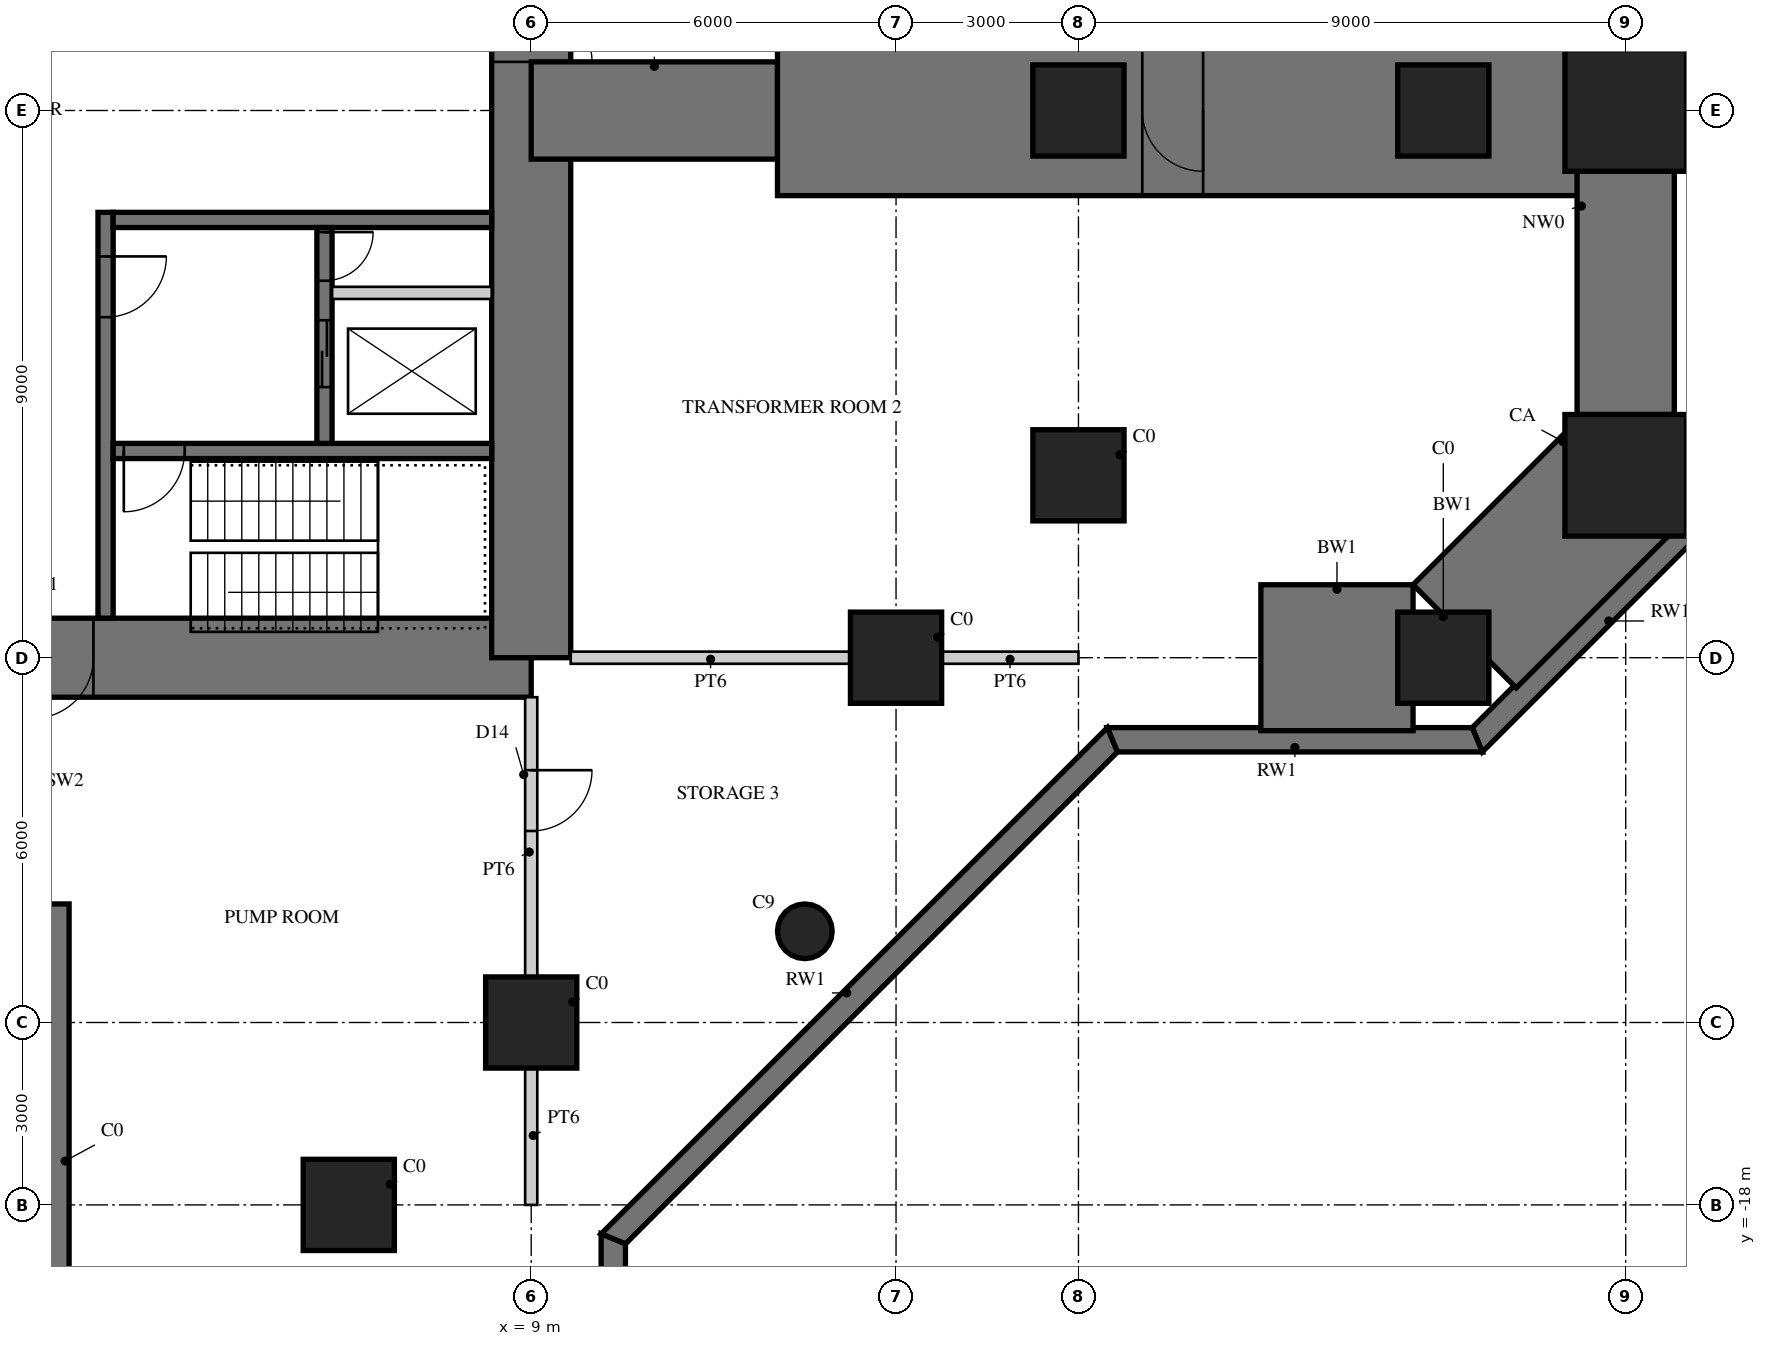
"""IFC4 building model, lengths in metres.
Left out: names, types, materials, properties, quantities, classifications, styles, units other than length and angle.
Written with IfcOpenShell. Run it as: python <this file> out.ifc"""

import sys

from ifc_helpers import new_model, si_unit, direction, frame, frame_2d, origin, origin_2d, place, context, subcontext, project, spatial, polyline, rectangle, circle, outline, extrude, element, fill, save


model = new_model("IFC4")
c1 = context("Model", 3, precision=1e-05, world=origin(), true_north=direction((0.0, 1.0)))
c2 = subcontext(c1, "Body", "Model", "MODEL_VIEW")
j1 = project(units=[si_unit("LENGTHUNIT", "METRE"), si_unit("PLANEANGLEUNIT", "RADIAN")], contexts=[c1])
p1 = place(None, origin())
s1 = spatial("IfcSite", under=j1, at=p1, CompositionType="ELEMENT")
p2 = place(p1, origin())
s2 = spatial("IfcBuilding", under=s1, at=p2, CompositionType="ELEMENT")
p3 = place(p2, frame((0.0, 0.0, -8.0)))
s3 = spatial("IfcBuildingStorey", under=s2, at=p3, CompositionType="ELEMENT", Elevation=-8.0)
p4 = place(p3, origin())
e1 = element("IfcWall", 1, at=p4, inside=s3, PredefinedType="SOLIDWALL", context=c2, shape_type="SweptSolid", body=[
    extrude(outline(polyline([(18.476, -10.15), (18.642, -10.55), (10.55, -18.642), (10.15, -18.476), (18.476, -10.15)])), origin(), (0.0, 0.0, 1.0), 4.0),
])
p5 = place(p3, origin())
e2 = element("IfcWall", 2, at=p5, inside=s3, PredefinedType="SOLIDWALL", context=c2, shape_type="SweptSolid", body=[
    extrude(outline(polyline([(10.15, -18.476), (10.55, -18.642), (10.55, -24.642), (10.15, -24.476), (10.15, -18.476)])), origin(), (0.0, 0.0, 1.0), 4.0),
])
p6 = place(p3, origin())
e3 = element("IfcWall", 3, at=p6, inside=s3, PredefinedType="SOLIDWALL", context=c2, shape_type="SweptSolid", body=[
    extrude(outline(polyline([(28.15, -6.476), (28.55, -6.642), (24.642, -10.55), (24.476, -10.15), (28.15, -6.476)])), origin(), (0.0, 0.0, 1.0), 4.0),
])
p7 = place(p3, origin())
e4 = element("IfcWall", 4, at=p7, inside=s3, PredefinedType="SOLIDWALL", context=c2, shape_type="SweptSolid", body=[
    extrude(outline(polyline([(24.476, -10.15), (24.642, -10.55), (18.642, -10.55), (18.476, -10.15), (24.476, -10.15)])), origin(), (0.0, 0.0, 1.0), 4.0),
])
p8 = place(p3, frame((-9.0, -9.0, 0.0), z_axis=(0.0, 0.0, 1.0), x_axis=(1.0, 0.0, 0.0)))
e5 = element("IfcWall", 5, at=p8, inside=s3, PredefinedType="SHEAR", context=c2, shape_type="SweptSolid", body=[
    extrude(rectangle(XDim=18.0, YDim=1.3, at=frame_2d((9.0, 0.0))), origin(), (0.0, 0.0, 1.0), 4.0),
])
p9 = place(p8, frame((9.8, 0.0, 0.0)))
e6 = element("IfcOpeningElement", 6, at=p9, cuts=e5, PredefinedType="OPENING", context=c2, shape_type="SweptSolid", body=[
    extrude(rectangle(XDim=1.0, YDim=2.4, at=frame_2d((0.5, 1.2))), frame((0.0, 0.66, 0.0), z_axis=(0.0, -1.0, 0.0), x_axis=(1.0, 0.0, 0.0)), (0.0, 0.0, 1.0), 1.32),
])
p10 = place(p3, frame((9.0, -9.0, 0.0), z_axis=(0.0, 0.0, 1.0), x_axis=(0.0, 1.0, 0.0)))
e7 = element("IfcWall", 7, at=p10, inside=s3, PredefinedType="SHEAR", context=c2, shape_type="SweptSolid", body=[
    extrude(rectangle(XDim=18.0, YDim=1.3, at=frame_2d((9.0, 0.0))), origin(), (0.0, 0.0, 1.0), 4.0),
])
p11 = place(p10, frame((9.8, 0.0, 0.0)))
e8 = element("IfcOpeningElement", 8, at=p11, cuts=e7, PredefinedType="OPENING", context=c2, shape_type="SweptSolid", body=[
    extrude(rectangle(XDim=1.0, YDim=2.4, at=frame_2d((0.5, 1.2))), frame((0.0, 0.66, 0.0), z_axis=(0.0, -1.0, 0.0), x_axis=(1.0, 0.0, 0.0)), (0.0, 0.0, 1.0), 1.32),
])
p12 = place(p3, frame((2.0, -1.675, 0.0), z_axis=(0.0, 0.0, 1.0), x_axis=(0.0, -1.0, 0.0)))
e9 = element("IfcWall", 9, at=p12, inside=s3, PredefinedType="SHEAR", context=c2, shape_type="SweptSolid", body=[
    extrude(rectangle(XDim=6.675, YDim=0.25, at=frame_2d((3.337, 0.0))), origin(), (0.0, 0.0, 1.0), 4.0),
])
p13 = place(p12, frame((0.725, 0.0, 0.0)))
e10 = element("IfcOpeningElement", 10, at=p13, cuts=e9, PredefinedType="OPENING", context=c2, shape_type="SweptSolid", body=[
    extrude(rectangle(XDim=1.0, YDim=2.1, at=frame_2d((0.5, 1.05))), frame((0.0, 0.135, 0.0), z_axis=(0.0, -1.0, 0.0), x_axis=(1.0, 0.0, 0.0)), (0.0, 0.0, 1.0), 0.27),
])
p14 = place(p3, frame((2.125, -1.8, 0.0), z_axis=(0.0, 0.0, 1.0), x_axis=(1.0, 0.0, 0.0)))
e11 = element("IfcWall", 11, at=p14, inside=s3, PredefinedType="SHEAR", context=c2, shape_type="SweptSolid", body=[
    extrude(rectangle(XDim=6.225, YDim=0.25, at=frame_2d((3.113, 0.0))), origin(), (0.0, 0.0, 1.0), 4.0),
])
p15 = place(p3, frame((2.125, -5.6, 0.0), z_axis=(0.0, 0.0, 1.0), x_axis=(1.0, 0.0, 0.0)))
e12 = element("IfcWall", 12, at=p15, inside=s3, PredefinedType="SHEAR", context=c2, shape_type="SweptSolid", body=[
    extrude(rectangle(XDim=6.225, YDim=0.25, at=frame_2d((3.113, 0.0))), origin(), (0.0, 0.0, 1.0), 4.0),
])
p16 = place(p15, frame((0.175, 0.0, 0.0)))
e13 = element("IfcOpeningElement", 13, at=p16, cuts=e12, PredefinedType="OPENING", context=c2, shape_type="SweptSolid", body=[
    extrude(rectangle(XDim=1.0, YDim=2.1, at=frame_2d((0.5, 1.05))), frame((0.0, 0.135, 0.0), z_axis=(0.0, -1.0, 0.0), x_axis=(1.0, 0.0, 0.0)), (0.0, 0.0, 1.0), 0.27),
])
p17 = place(p3, frame((5.6, -1.925, 0.0), z_axis=(0.0, 0.0, 1.0), x_axis=(0.0, -1.0, 0.0)))
e14 = element("IfcWall", 14, at=p17, inside=s3, PredefinedType="SHEAR", context=c2, shape_type="SweptSolid", body=[
    extrude(rectangle(XDim=3.55, YDim=0.25, at=frame_2d((1.775, 0.0))), origin(), (0.0, 0.0, 1.0), 4.0),
])
p18 = place(p17, frame((1.525, 0.0, 0.0)))
e15 = element("IfcOpeningElement", 15, at=p18, cuts=e14, PredefinedType="OPENING", context=c2, shape_type="SweptSolid", body=[
    extrude(rectangle(XDim=1.1, YDim=2.2, at=frame_2d((0.55, 1.1))), frame((0.0, 0.135, 0.0), z_axis=(0.0, -1.0, 0.0), x_axis=(1.0, 0.0, 0.0)), (0.0, 0.0, 1.0), 0.27),
])
p19 = place(p17, frame((0.075, 0.0, 0.0)))
e16 = element("IfcOpeningElement", 16, at=p19, cuts=e14, PredefinedType="OPENING", context=c2, shape_type="SweptSolid", body=[
    extrude(rectangle(XDim=0.8, YDim=2.1, at=frame_2d((0.4, 1.05))), frame((0.0, 0.135, 0.0), z_axis=(0.0, -1.0, 0.0), x_axis=(1.0, 0.0, 0.0)), (0.0, 0.0, 1.0), 0.27),
])
p20 = place(p3, frame((5.725, -3.0, 0.0), z_axis=(0.0, 0.0, 1.0), x_axis=(1.0, 0.0, 0.0)))
e17 = element("IfcWall", 17, at=p20, inside=s3, PredefinedType="PARTITIONING", context=c2, shape_type="SweptSolid", body=[
    extrude(rectangle(XDim=2.625, YDim=0.2, at=frame_2d((1.312, 0.0))), origin(), (0.0, 0.0, 1.0), 4.0),
])
p21 = place(p3, frame((9.0, 0.0, 0.0), z_axis=(0.0, 0.0, 1.0), x_axis=(1.0, 0.0, 0.0)))
e18 = element("IfcWall", 18, at=p21, inside=s3, PredefinedType="SHEAR", context=c2, shape_type="SweptSolid", body=[
    extrude(rectangle(XDim=4.05, YDim=1.6, at=frame_2d((2.025, 0.0))), origin(), (0.0, 0.0, 1.0), 4.0),
])
p22 = place(p3, frame((13.05, 0.0, 0.0), z_axis=(0.0, 0.0, 1.0), x_axis=(1.0, 0.0, 0.0)))
e19 = element("IfcWall", 19, at=p22, inside=s3, PredefinedType="SHEAR", context=c2, shape_type="SweptSolid", body=[
    extrude(rectangle(XDim=13.95, YDim=2.8, at=frame_2d((6.975, 0.0))), origin(), (0.0, 0.0, 1.0), 4.0),
])
p23 = place(p22, frame((6.0, 0.0, 0.0)))
e20 = element("IfcOpeningElement", 20, at=p23, cuts=e19, PredefinedType="OPENING", context=c2, shape_type="SweptSolid", body=[
    extrude(rectangle(XDim=1.0, YDim=2.2, at=frame_2d((0.5, 1.1))), frame((0.0, 1.41, 0.0), z_axis=(0.0, -1.0, 0.0), x_axis=(1.0, 0.0, 0.0)), (0.0, 0.0, 1.0), 2.82),
])
p24 = place(p3, frame((21.0, -9.0, 0.0), z_axis=(0.0, 0.0, 1.0), x_axis=(1.0, 0.0, 0.0)))
e21 = element("IfcWall", 21, at=p24, inside=s3, PredefinedType="SHEAR", context=c2, shape_type="SweptSolid", body=[
    extrude(rectangle(XDim=2.503, YDim=2.4, at=frame_2d((1.251, 0.0))), origin(), (0.0, 0.0, 1.0), 4.0),
])
p25 = place(p3, frame((24.352, -8.648, 0.0), z_axis=(0.0, 0.0, 1.0), x_axis=(0.707106781187, 0.707106781187, 0.0)))
e22 = element("IfcWall", 22, at=p25, inside=s3, PredefinedType="SHEAR", context=c2, shape_type="SweptSolid", body=[
    extrude(rectangle(XDim=3.745, YDim=2.4, at=frame_2d((1.873, 0.0))), origin(), (0.0, 0.0, 1.0), 4.0),
])
p26 = place(p3, frame((27.0, -5.0, 0.0), z_axis=(0.0, 0.0, 1.0), x_axis=(0.0, 1.0, 0.0)))
e23 = element("IfcWall", 23, at=p26, inside=s3, PredefinedType="SHEAR", context=c2, shape_type="SweptSolid", body=[
    extrude(rectangle(XDim=10.0, YDim=1.6, at=frame_2d((5.0, 0.0))), origin(), (0.0, 0.0, 1.0), 4.0),
])
p27 = place(p3, frame((0.0, -13.05, 0.0), z_axis=(0.0, 0.0, 1.0), x_axis=(0.0, -1.0, 0.0)))
e24 = element("IfcWall", 24, at=p27, inside=s3, PredefinedType="SHEAR", context=c2, shape_type="SweptSolid", body=[
    extrude(rectangle(XDim=13.95, YDim=2.8, at=frame_2d((6.975, 0.0))), origin(), (0.0, 0.0, 1.0), 4.0),
])
p28 = place(p27, frame((6.0, 0.0, 0.0)))
e25 = element("IfcOpeningElement", 25, at=p28, cuts=e24, PredefinedType="OPENING", context=c2, shape_type="SweptSolid", body=[
    extrude(rectangle(XDim=1.0, YDim=2.2, at=frame_2d((0.5, 1.1))), frame((0.0, 1.41, 0.0), z_axis=(0.0, -1.0, 0.0), x_axis=(1.0, 0.0, 0.0)), (0.0, 0.0, 1.0), 2.82),
])
for number, where, z_axis, x_axis in (
    (26, (15.0, -9.0, 0.0), (0.0, 0.0, 1.0), (1.0, 0.0, 0.0)),
    (27, (24.0, -9.0, 0.0), (0.0, 0.0, 1.0), (1.0, 0.0, 0.0)),
):
    element("IfcColumn", number, at=place(p3, frame(where, z_axis=z_axis, x_axis=x_axis)), inside=s3, PredefinedType="COLUMN", context=c2, shape_type="SweptSolid", body=[
        extrude(rectangle(XDim=1.5, YDim=1.5, at=origin_2d()), origin(), (0.0, 0.0, 1.0), 4.0),
    ])
for number, where, z_axis, x_axis in (
    (28, (27.0, -6.0, 0.0), (0.0, 0.0, 1.0), (1.0, 0.0, 0.0)),
    (29, (27.0, 0.0, 0.0), (0.0, 0.0, 1.0), (1.0, 0.0, 0.0)),
):
    element("IfcColumn", number, at=place(p3, frame(where, z_axis=z_axis, x_axis=x_axis)), inside=s3, PredefinedType="COLUMN", context=c2, shape_type="SweptSolid", body=[
        extrude(rectangle(XDim=2.0, YDim=2.0, at=origin_2d()), origin(), (0.0, 0.0, 1.0), 4.0),
    ])
for number, where, z_axis, x_axis in (
    (30, (9.0, -15.0, 0.0), (0.0, 0.0, 1.0), (1.0, 0.0, 0.0)),
    (31, (18.0, -6.0, 0.0), (0.0, 0.0, 1.0), (1.0, 0.0, 0.0)),
    (32, (18.0, 0.0, 0.0), (0.0, 0.0, 1.0), (1.0, 0.0, 0.0)),
    (33, (24.0, 0.0, 0.0), (0.0, 0.0, 1.0), (1.0, 0.0, 0.0)),
    (34, (6.0, -18.0, 0.0), (0.0, 0.0, 1.0), (1.0, 0.0, 0.0)),
):
    element("IfcColumn", number, at=place(p3, frame(where, z_axis=z_axis, x_axis=x_axis)), inside=s3, PredefinedType="COLUMN", context=c2, shape_type="SweptSolid", body=[
        extrude(rectangle(XDim=1.5, YDim=1.5, at=origin_2d()), origin(), (0.0, 0.0, 1.0), 4.0),
    ])
p29 = place(p3, frame((13.5, -13.5, 0.0), z_axis=(0.0, 0.0, 1.0), x_axis=(1.0, 0.0, 0.0)))
e35 = element("IfcColumn", 35, at=p29, inside=s3, PredefinedType="COLUMN", context=c2, shape_type="SweptSolid", body=[
    extrude(circle(Radius=0.45, at=origin_2d()), origin(), (0.0, 0.0, 1.0), 4.0),
])
p30 = place(p3, frame((9.0, -9.65, 0.0), z_axis=(0.0, 0.0, 1.0), x_axis=(0.0, -1.0, 0.0)))
e36 = element("IfcWall", 36, at=p30, inside=s3, PredefinedType="SOLIDWALL", context=c2, shape_type="SweptSolid", body=[
    extrude(rectangle(XDim=4.6, YDim=0.2, at=frame_2d((2.3, 0.0))), origin(), (0.0, 0.0, 1.0), 2.75),
])
p31 = place(p30, frame((1.2, 0.0, 0.0)))
e37 = element("IfcOpeningElement", 37, at=p31, cuts=e36, PredefinedType="OPENING", context=c2, shape_type="SweptSolid", body=[
    extrude(rectangle(XDim=1.0, YDim=2.2, at=frame_2d((0.5, 1.1))), frame((0.0, 0.11, 0.0), z_axis=(0.0, -1.0, 0.0), x_axis=(1.0, 0.0, 0.0)), (0.0, 0.0, 1.0), 0.22),
])
p32 = place(p3, frame((9.0, -15.75, 0.0), z_axis=(0.0, 0.0, 1.0), x_axis=(0.0, -1.0, 0.0)))
e38 = element("IfcWall", 38, at=p32, inside=s3, PredefinedType="SOLIDWALL", context=c2, shape_type="SweptSolid", body=[
    extrude(rectangle(XDim=2.25, YDim=0.2, at=frame_2d((1.125, 0.0))), origin(), (0.0, 0.0, 1.0), 2.75),
])
p33 = place(p3, frame((14.25, -9.0, 0.0), z_axis=(0.0, 0.0, 1.0), x_axis=(-1.0, 0.0, 0.0)))
e39 = element("IfcWall", 39, at=p33, inside=s3, PredefinedType="SOLIDWALL", context=c2, shape_type="SweptSolid", body=[
    extrude(rectangle(XDim=4.6, YDim=0.2, at=frame_2d((2.3, 0.0))), origin(), (0.0, 0.0, 1.0), 2.75),
])
p34 = place(p3, frame((18.0, -9.0, 0.0), z_axis=(0.0, 0.0, 1.0), x_axis=(-1.0, 0.0, 0.0)))
e40 = element("IfcWall", 40, at=p34, inside=s3, PredefinedType="SOLIDWALL", context=c2, shape_type="SweptSolid", body=[
    extrude(rectangle(XDim=2.25, YDim=0.2, at=frame_2d((1.125, 0.0))), origin(), (0.0, 0.0, 1.0), 2.75),
])
p35 = place(p31, origin())
e41 = element("IfcDoor", 41, at=p35, inside=s3, OperationType="SINGLE_SWING_LEFT", PredefinedType="DOOR", context=c2, shape_type="SweptSolid", body=[
    extrude(rectangle(XDim=1.0, YDim=2.2, at=frame_2d((0.5, 1.1))), frame((0.0, 0.025, 0.0), z_axis=(0.0, -1.0, 0.0), x_axis=(1.0, 0.0, 0.0)), (0.0, 0.0, 1.0), 0.05),
])
fill(e37, e41)
p36 = place(p23, frame((1.0, 0.0, 0.0), z_axis=(0.0, 0.0, 1.0), x_axis=(-1.0, 0.0, 0.0)))
e42 = element("IfcDoor", 42, at=p36, inside=s3, OperationType="SINGLE_SWING_LEFT", PredefinedType="DOOR", context=c2, shape_type="SweptSolid", body=[
    extrude(rectangle(XDim=1.0, YDim=2.2, at=frame_2d((0.5, 1.1))), frame((0.0, 0.025, 0.0), z_axis=(0.0, -1.0, 0.0), x_axis=(1.0, 0.0, 0.0)), (0.0, 0.0, 1.0), 0.05),
])
fill(e20, e42)
p37 = place(p9, frame((1.0, 0.0, 0.0), z_axis=(0.0, 0.0, 1.0), x_axis=(-1.0, 0.0, 0.0)))
e43 = element("IfcDoor", 43, at=p37, inside=s3, OperationType="SINGLE_SWING_RIGHT", PredefinedType="DOOR", context=c2, shape_type="SweptSolid", body=[
    extrude(rectangle(XDim=1.0, YDim=2.4, at=frame_2d((0.5, 1.2))), frame((0.0, -0.005, 0.0), z_axis=(0.0, -1.0, 0.0), x_axis=(1.0, 0.0, 0.0)), (0.0, 0.0, 1.0), 0.05),
])
fill(e6, e43)
p38 = place(p11, frame((1.0, 0.0, 0.0), z_axis=(0.0, 0.0, 1.0), x_axis=(-1.0, 0.0, 0.0)))
e44 = element("IfcDoor", 44, at=p38, inside=s3, OperationType="SINGLE_SWING_RIGHT", PredefinedType="DOOR", context=c2, shape_type="SweptSolid", body=[
    extrude(rectangle(XDim=1.0, YDim=2.4, at=frame_2d((0.5, 1.2))), frame((0.0, -0.005, 0.0), z_axis=(0.0, -1.0, 0.0), x_axis=(1.0, 0.0, 0.0)), (0.0, 0.0, 1.0), 0.05),
])
fill(e8, e44)
p39 = place(p13, origin())
e45 = element("IfcDoor", 45, at=p39, inside=s3, OperationType="SINGLE_SWING_LEFT", PredefinedType="DOOR", context=c2, shape_type="SweptSolid", body=[
    extrude(rectangle(XDim=1.0, YDim=2.1, at=frame_2d((0.5, 1.05))), frame((0.0, 0.025, 0.0), z_axis=(0.0, -1.0, 0.0), x_axis=(1.0, 0.0, 0.0)), (0.0, 0.0, 1.0), 0.05),
])
fill(e10, e45)
p40 = place(p16, frame((1.0, 0.0, 0.0), z_axis=(0.0, 0.0, 1.0), x_axis=(-1.0, 0.0, 0.0)))
e46 = element("IfcDoor", 46, at=p40, inside=s3, OperationType="SINGLE_SWING_RIGHT", PredefinedType="DOOR", context=c2, shape_type="SweptSolid", body=[
    extrude(rectangle(XDim=1.0, YDim=2.1, at=frame_2d((0.5, 1.05))), frame((0.0, 0.025, 0.0), z_axis=(0.0, -1.0, 0.0), x_axis=(1.0, 0.0, 0.0)), (0.0, 0.0, 1.0), 0.05),
])
fill(e13, e46)
p41 = place(p18, origin())
e47 = element("IfcDoor", 47, at=p41, inside=s3, OperationType="DOUBLE_DOOR_SLIDING", PredefinedType="DOOR", context=c2, shape_type="SweptSolid", body=[
    extrude(rectangle(XDim=1.1, YDim=2.2, at=frame_2d((0.55, 1.1))), frame((0.0, 0.025, 0.0), z_axis=(0.0, -1.0, 0.0), x_axis=(1.0, 0.0, 0.0)), (0.0, 0.0, 1.0), 0.05),
])
fill(e15, e47)
p42 = place(p19, origin())
e48 = element("IfcDoor", 48, at=p42, inside=s3, OperationType="SINGLE_SWING_LEFT", PredefinedType="DOOR", context=c2, shape_type="SweptSolid", body=[
    extrude(rectangle(XDim=0.8, YDim=2.1, at=frame_2d((0.4, 1.05))), frame((0.0, 0.025, 0.0), z_axis=(0.0, -1.0, 0.0), x_axis=(1.0, 0.0, 0.0)), (0.0, 0.0, 1.0), 0.05),
])
fill(e16, e48)
save(model, sys.argv[1])
